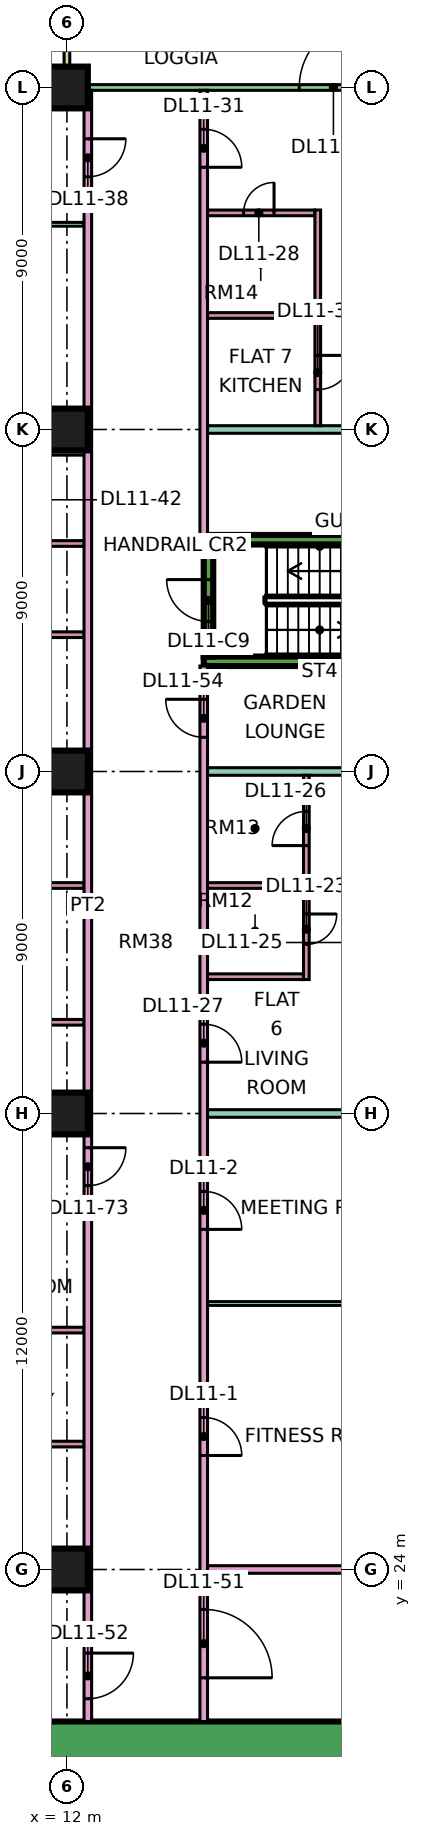
"""IFC4 building model, lengths in metres.
Left out: names, types, materials, properties, quantities, classifications, styles, units other than length and angle.
Written with IfcOpenShell. Run it as: python <this file> out.ifc"""

import sys

from ifc_helpers import new_model, si_unit, direction, frame, frame_2d, origin, origin_2d, place, context, subcontext, project, spatial, rectangle, extrude, element, fill, save


model = new_model("IFC4")
c1 = context("Model", 3, precision=1e-05, world=origin(), true_north=direction((0.0, 1.0)))
c2 = subcontext(c1, "Body", "Model", "MODEL_VIEW")
j1 = project(units=[si_unit("LENGTHUNIT", "METRE"), si_unit("PLANEANGLEUNIT", "RADIAN")], contexts=[c1])
p1 = place(None, origin())
s1 = spatial("IfcSite", under=j1, at=p1, CompositionType="ELEMENT")
p2 = place(p1, origin())
s2 = spatial("IfcBuilding", under=s1, at=p2, CompositionType="ELEMENT")
p3 = place(p2, frame((0.0, 0.0, 56.4)))
s3 = spatial("IfcBuildingStorey", under=s2, at=p3, CompositionType="ELEMENT", Elevation=56.4)
for number, where, z_axis, x_axis in (
    (1, (12.0, 24.0, 0.0), (0.0, 0.0, 1.0), (1.0, 0.0, 0.0)),
    (2, (12.0, 36.0, 0.0), (0.0, 0.0, 1.0), (1.0, 0.0, 0.0)),
    (3, (12.0, 45.0, 0.0), (0.0, 0.0, 1.0), (1.0, 0.0, 0.0)),
    (4, (12.0, 54.0, 0.0), (0.0, 0.0, 1.0), (1.0, 0.0, 0.0)),
    (5, (12.0, 63.0, 0.0), (0.0, 0.0, 1.0), (1.0, 0.0, 0.0)),
):
    element("IfcColumn", number, at=place(p3, frame(where, z_axis=z_axis, x_axis=x_axis)), inside=s3, PredefinedType="COLUMN", context=c2, shape_type="SweptSolid", body=[
        extrude(rectangle(XDim=1.1, YDim=1.1, at=origin_2d()), origin(), (0.0, 0.0, 1.0), 3.75),
    ])
p4 = place(p3, frame((9.0, 19.45, 0.0), z_axis=(0.0, 0.0, 1.0), x_axis=(1.0, 0.0, 0.0)))
e6 = element("IfcWall", 6, at=p4, inside=s3, PredefinedType="SHEAR", context=c2, shape_type="SweptSolid", body=[
    extrude(rectangle(XDim=25.0, YDim=1.1, at=frame_2d((12.5, 0.0))), origin(), (0.0, 0.0, 1.0), 3.75),
])
p5 = place(p4, frame((19.1, 0.0, 0.0)))
e7 = element("IfcOpeningElement", 7, at=p5, cuts=e6, PredefinedType="OPENING", context=c2, shape_type="SweptSolid", body=[
    extrude(rectangle(XDim=1.8, YDim=2.4, at=frame_2d((0.9, 1.2))), frame((0.0, 0.56, 0.0), z_axis=(0.0, -1.0, 0.0), x_axis=(1.0, 0.0, 0.0)), (0.0, 0.0, 1.0), 1.12),
])
for number, where, z_axis, x_axis in (
    (8, (15.6, 47.9, 0.0), (0.0, 0.0, 1.0), (1.0, 0.0, 0.0)),
    (9, (15.6, 51.1, 0.0), (0.0, 0.0, 1.0), (1.0, 0.0, 0.0)),
):
    element("IfcWall", number, at=place(p3, frame(where, z_axis=z_axis, x_axis=x_axis)), inside=s3, PredefinedType="SHEAR", context=c2, shape_type="SweptSolid", body=[
        extrude(rectangle(XDim=7.0, YDim=0.25, at=frame_2d((3.5, 0.0))), origin(), (0.0, 0.0, 1.0), 3.75),
    ])
p6 = place(p3, frame((15.725, 48.025, 0.0), z_axis=(0.0, 0.0, 1.0), x_axis=(0.0, 1.0, 0.0)))
e10 = element("IfcWall", 10, at=p6, inside=s3, PredefinedType="SHEAR", context=c2, shape_type="SweptSolid", body=[
    extrude(rectangle(XDim=2.95, YDim=0.25, at=frame_2d((1.475, 0.0))), origin(), (0.0, 0.0, 1.0), 3.75),
])
p7 = place(p6, frame((0.925, 0.0, 0.0)))
e11 = element("IfcOpeningElement", 11, at=p7, cuts=e10, PredefinedType="OPENING", context=c2, shape_type="SweptSolid", body=[
    extrude(rectangle(XDim=1.1, YDim=2.2, at=frame_2d((0.55, 1.1))), frame((0.0, 0.135, 0.0), z_axis=(0.0, -1.0, 0.0), x_axis=(1.0, 0.0, 0.0)), (0.0, 0.0, 1.0), 0.27),
])
p8 = place(p3, frame((22.425, 63.0, 0.0), z_axis=(0.0, 0.0, 1.0), x_axis=(-1.0, 0.0, 0.0)))
e12 = element("IfcWall", 12, at=p8, inside=s3, PredefinedType="SOLIDWALL", context=c2, shape_type="SweptSolid", body=[
    extrude(rectangle(XDim=10.35, YDim=0.15, at=frame_2d((5.175, 0.0))), origin(), (0.0, 0.0, 1.0), 3.35),
])
p9 = place(p8, frame((2.512, 0.0, 0.0)))
e13 = element("IfcOpeningElement", 13, at=p9, cuts=e12, PredefinedType="OPENING", context=c2, shape_type="SweptSolid", body=[
    extrude(rectangle(XDim=1.8, YDim=2.4, at=frame_2d((0.9, 1.2))), frame((0.0, 0.085, 0.0), z_axis=(0.0, -1.0, 0.0), x_axis=(1.0, 0.0, 0.0)), (0.0, 0.0, 1.0), 0.17),
])
p10 = place(p3, frame((12.0, 64.5, 0.0), z_axis=(0.0, 0.0, 1.0), x_axis=(0.0, -1.0, 0.0)))
e14 = element("IfcWall", 14, at=p10, inside=s3, PredefinedType="SOLIDWALL", context=c2, shape_type="SweptSolid", body=[
    extrude(rectangle(XDim=1.5, YDim=0.15, at=frame_2d((0.75, 0.0))), origin(), (0.0, 0.0, 1.0), 3.35),
])
p11 = place(p3, frame((0.0, 36.0, 0.0), z_axis=(0.0, 0.0, 1.0), x_axis=(1.0, 0.0, 0.0)))
e15 = element("IfcWall", 15, at=p11, inside=s3, PredefinedType="PARTITIONING", context=c2, shape_type="SweptSolid", body=[
    extrude(rectangle(XDim=12.45, YDim=0.2, at=frame_2d((6.225, 0.0))), origin(), (0.0, 0.0, 1.0), 3.35),
])
p12 = place(p3, frame((0.074, 22.4, 0.0), z_axis=(0.0, 0.0, 1.0), x_axis=(1.0, 0.0, 0.0)))
e16 = element("IfcWall", 16, at=p12, inside=s3, PredefinedType="PARTITIONING", context=c2, shape_type="SweptSolid", body=[
    extrude(rectangle(XDim=12.376, YDim=0.2, at=frame_2d((6.188, 0.0))), origin(), (0.0, 0.0, 1.0), 3.35),
])
for number, where, z_axis, x_axis in (
    (17, (7.225, 38.4, 0.0), (0.0, 0.0, 1.0), (1.0, 0.0, 0.0)),
    (18, (7.225, 42.0, 0.0), (0.0, 0.0, 1.0), (1.0, 0.0, 0.0)),
    (19, (7.225, 45.0, 0.0), (0.0, 0.0, 1.0), (1.0, 0.0, 0.0)),
    (20, (7.225, 48.6, 0.0), (0.0, 0.0, 1.0), (1.0, 0.0, 0.0)),
    (21, (7.225, 51.0, 0.0), (0.0, 0.0, 1.0), (1.0, 0.0, 0.0)),
    (22, (7.225, 53.4, 0.0), (0.0, 0.0, 1.0), (1.0, 0.0, 0.0)),
):
    element("IfcWall", number, at=place(p3, frame(where, z_axis=z_axis, x_axis=x_axis)), inside=s3, PredefinedType="PARTITIONING", context=c2, shape_type="SweptSolid", body=[
        extrude(rectangle(XDim=5.225, YDim=0.15, at=frame_2d((2.612, 0.0))), origin(), (0.0, 0.0, 1.0), 3.35),
    ])
p13 = place(p3, frame((7.225, 59.4, 0.0), z_axis=(0.0, 0.0, 1.0), x_axis=(1.0, 0.0, 0.0)))
e23 = element("IfcWall", 23, at=p13, inside=s3, PredefinedType="PARTITIONING", context=c2, shape_type="SweptSolid", body=[
    extrude(rectangle(XDim=5.225, YDim=0.1, at=frame_2d((2.612, 0.0))), origin(), (0.0, 0.0, 1.0), 3.35),
])
for number, where, z_axis, x_axis in (
    (24, (8.425, 27.3, 0.0), (0.0, 0.0, 1.0), (1.0, 0.0, 0.0)),
    (25, (8.425, 30.3, 0.0), (0.0, 0.0, 1.0), (1.0, 0.0, 0.0)),
    (26, (8.425, 33.3, 0.0), (0.0, 0.0, 1.0), (1.0, 0.0, 0.0)),
):
    element("IfcWall", number, at=place(p3, frame(where, z_axis=z_axis, x_axis=x_axis)), inside=s3, PredefinedType="PARTITIONING", context=c2, shape_type="SweptSolid", body=[
        extrude(rectangle(XDim=4.025, YDim=0.15, at=frame_2d((2.012, 0.0))), origin(), (0.0, 0.0, 1.0), 3.35),
    ])
p14 = place(p3, frame((12.55, 20.0, 0.0), z_axis=(0.0, 0.0, 1.0), x_axis=(0.0, 1.0, 0.0)))
e27 = element("IfcWall", 27, at=p14, inside=s3, PredefinedType="PARTITIONING", context=c2, shape_type="SweptSolid", body=[
    extrude(rectangle(XDim=42.926, YDim=0.2, at=frame_2d((21.463, 0.0))), origin(), (0.0, 0.0, 1.0), 3.35),
])
p15 = place(p14, frame((40.65, 0.0, 0.0)))
e28 = element("IfcOpeningElement", 28, at=p15, cuts=e27, PredefinedType="OPENING", context=c2, shape_type="SweptSolid", body=[
    extrude(rectangle(XDim=1.0, YDim=2.1, at=frame_2d((0.5, 1.05))), frame((0.0, 0.11, 0.0), z_axis=(0.0, -1.0, 0.0), x_axis=(1.0, 0.0, 0.0)), (0.0, 0.0, 1.0), 0.22),
])
p16 = place(p14, frame((0.6, 0.0, 0.0)))
e29 = element("IfcOpeningElement", 29, at=p16, cuts=e27, PredefinedType="OPENING", context=c2, shape_type="SweptSolid", body=[
    extrude(rectangle(XDim=1.2, YDim=2.1, at=frame_2d((0.6, 1.05))), frame((0.0, 0.11, 0.0), z_axis=(0.0, -1.0, 0.0), x_axis=(1.0, 0.0, 0.0)), (0.0, 0.0, 1.0), 0.22),
])
p17 = place(p14, frame((14.1, 0.0, 0.0)))
e30 = element("IfcOpeningElement", 30, at=p17, cuts=e27, PredefinedType="OPENING", context=c2, shape_type="SweptSolid", body=[
    extrude(rectangle(XDim=1.0, YDim=2.1, at=frame_2d((0.5, 1.05))), frame((0.0, 0.11, 0.0), z_axis=(0.0, -1.0, 0.0), x_axis=(1.0, 0.0, 0.0)), (0.0, 0.0, 1.0), 0.22),
])
p18 = place(p3, frame((15.6, 20.0, 0.0), z_axis=(0.0, 0.0, 1.0), x_axis=(0.0, 1.0, 0.0)))
e31 = element("IfcWall", 31, at=p18, inside=s3, PredefinedType="PARTITIONING", context=c2, shape_type="SweptSolid", body=[
    extrude(rectangle(XDim=27.775, YDim=0.2, at=frame_2d((13.887, 0.0))), origin(), (0.0, 0.0, 1.0), 3.35),
])
p19 = place(p18, frame((7.0, 0.0, 0.0)))
e32 = element("IfcOpeningElement", 32, at=p19, cuts=e31, PredefinedType="OPENING", context=c2, shape_type="SweptSolid", body=[
    extrude(rectangle(XDim=1.0, YDim=2.1, at=frame_2d((0.5, 1.05))), frame((0.0, 0.11, 0.0), z_axis=(0.0, -1.0, 0.0), x_axis=(1.0, 0.0, 0.0)), (0.0, 0.0, 1.0), 0.22),
])
p20 = place(p18, frame((12.95, 0.0, 0.0)))
e33 = element("IfcOpeningElement", 33, at=p20, cuts=e31, PredefinedType="OPENING", context=c2, shape_type="SweptSolid", body=[
    extrude(rectangle(XDim=1.0, YDim=2.1, at=frame_2d((0.5, 1.05))), frame((0.0, 0.11, 0.0), z_axis=(0.0, -1.0, 0.0), x_axis=(1.0, 0.0, 0.0)), (0.0, 0.0, 1.0), 0.22),
])
p21 = place(p18, frame((17.35, 0.0, 0.0)))
e34 = element("IfcOpeningElement", 34, at=p21, cuts=e31, PredefinedType="OPENING", context=c2, shape_type="SweptSolid", body=[
    extrude(rectangle(XDim=1.0, YDim=2.1, at=frame_2d((0.5, 1.05))), frame((0.0, 0.11, 0.0), z_axis=(0.0, -1.0, 0.0), x_axis=(1.0, 0.0, 0.0)), (0.0, 0.0, 1.0), 0.22),
])
p22 = place(p18, frame((1.15, 0.0, 0.0)))
e35 = element("IfcOpeningElement", 35, at=p22, cuts=e31, PredefinedType="OPENING", context=c2, shape_type="SweptSolid", body=[
    extrude(rectangle(XDim=1.8, YDim=2.1, at=frame_2d((0.9, 1.05))), frame((0.0, 0.11, 0.0), z_axis=(0.0, -1.0, 0.0), x_axis=(1.0, 0.0, 0.0)), (0.0, 0.0, 1.0), 0.22),
])
p23 = place(p18, frame((25.9, 0.0, 0.0)))
e36 = element("IfcOpeningElement", 36, at=p23, cuts=e31, PredefinedType="OPENING", context=c2, shape_type="SweptSolid", body=[
    extrude(rectangle(XDim=1.0, YDim=2.1, at=frame_2d((0.5, 1.05))), frame((0.0, 0.11, 0.0), z_axis=(0.0, -1.0, 0.0), x_axis=(1.0, 0.0, 0.0)), (0.0, 0.0, 1.0), 0.22),
])
p24 = place(p3, frame((15.6, 51.225, 0.0), z_axis=(0.0, 0.0, 1.0), x_axis=(0.0, 1.0, 0.0)))
e37 = element("IfcWall", 37, at=p24, inside=s3, PredefinedType="PARTITIONING", context=c2, shape_type="SweptSolid", body=[
    extrude(rectangle(XDim=11.701, YDim=0.2, at=frame_2d((5.851, 0.0))), origin(), (0.0, 0.0, 1.0), 3.35),
])
p25 = place(p24, frame((9.675, 0.0, 0.0)))
e38 = element("IfcOpeningElement", 38, at=p25, cuts=e37, PredefinedType="OPENING", context=c2, shape_type="SweptSolid", body=[
    extrude(rectangle(XDim=1.0, YDim=2.1, at=frame_2d((0.5, 1.05))), frame((0.0, 0.11, 0.0), z_axis=(0.0, -1.0, 0.0), x_axis=(1.0, 0.0, 0.0)), (0.0, 0.0, 1.0), 0.22),
])
p26 = place(p3, frame((15.7, 24.0, 0.0), z_axis=(0.0, 0.0, 1.0), x_axis=(1.0, 0.0, 0.0)))
e39 = element("IfcWall", 39, at=p26, inside=s3, PredefinedType="PARTITIONING", context=c2, shape_type="SweptSolid", body=[
    extrude(rectangle(XDim=5.8, YDim=0.2, at=frame_2d((2.9, 0.0))), origin(), (0.0, 0.0, 1.0), 3.35),
])
p27 = place(p3, frame((15.7, 31.0, 0.0), z_axis=(0.0, 0.0, 1.0), x_axis=(1.0, 0.0, 0.0)))
e40 = element("IfcWall", 40, at=p27, inside=s3, PredefinedType="PARTITIONING", context=c2, shape_type="SweptSolid", body=[
    extrude(rectangle(XDim=5.8, YDim=0.1, at=frame_2d((2.9, 0.0))), origin(), (0.0, 0.0, 1.0), 3.35),
])
p28 = place(p3, frame((15.7, 36.0, 0.0), z_axis=(0.0, 0.0, 1.0), x_axis=(1.0, 0.0, 0.0)))
e41 = element("IfcWall", 41, at=p28, inside=s3, PredefinedType="PARTITIONING", context=c2, shape_type="SweptSolid", body=[
    extrude(rectangle(XDim=8.3, YDim=0.2, at=frame_2d((4.15, 0.0))), origin(), (0.0, 0.0, 1.0), 3.35),
])
for number, where, z_axis, x_axis in (
    (42, (15.7, 39.6, 0.0), (0.0, 0.0, 1.0), (1.0, 0.0, 0.0)),
    (43, (15.7, 42.0, 0.0), (0.0, 0.0, 1.0), (1.0, 0.0, 0.0)),
):
    element("IfcWall", number, at=place(p3, frame(where, z_axis=z_axis, x_axis=x_axis)), inside=s3, PredefinedType="PARTITIONING", context=c2, shape_type="SweptSolid", body=[
        extrude(rectangle(XDim=2.525, YDim=0.15, at=frame_2d((1.263, 0.0))), origin(), (0.0, 0.0, 1.0), 3.35),
    ])
p29 = place(p3, frame((15.7, 45.0, 0.0), z_axis=(0.0, 0.0, 1.0), x_axis=(1.0, 0.0, 0.0)))
e44 = element("IfcWall", 44, at=p29, inside=s3, PredefinedType="PARTITIONING", context=c2, shape_type="SweptSolid", body=[
    extrude(rectangle(XDim=8.226, YDim=0.2, at=frame_2d((4.113, 0.0))), origin(), (0.0, 0.0, 1.0), 3.35),
])
p30 = place(p3, frame((15.7, 54.0, 0.0), z_axis=(0.0, 0.0, 1.0), x_axis=(1.0, 0.0, 0.0)))
e45 = element("IfcWall", 45, at=p30, inside=s3, PredefinedType="PARTITIONING", context=c2, shape_type="SweptSolid", body=[
    extrude(rectangle(XDim=8.3, YDim=0.2, at=frame_2d((4.15, 0.0))), origin(), (0.0, 0.0, 1.0), 3.35),
])
p31 = place(p3, frame((15.7, 57.0, 0.0), z_axis=(0.0, 0.0, 1.0), x_axis=(1.0, 0.0, 0.0)))
e46 = element("IfcWall", 46, at=p31, inside=s3, PredefinedType="PARTITIONING", context=c2, shape_type="SweptSolid", body=[
    extrude(rectangle(XDim=2.825, YDim=0.15, at=frame_2d((1.413, 0.0))), origin(), (0.0, 0.0, 1.0), 3.35),
])
p32 = place(p3, frame((15.7, 59.7, 0.0), z_axis=(0.0, 0.0, 1.0), x_axis=(1.0, 0.0, 0.0)))
e47 = element("IfcWall", 47, at=p32, inside=s3, PredefinedType="PARTITIONING", context=c2, shape_type="SweptSolid", body=[
    extrude(rectangle(XDim=2.825, YDim=0.15, at=frame_2d((1.413, 0.0))), origin(), (0.0, 0.0, 1.0), 3.35),
])
p33 = place(p32, frame((0.95, 0.0, 0.0)))
e48 = element("IfcOpeningElement", 48, at=p33, cuts=e47, PredefinedType="OPENING", context=c2, shape_type="SweptSolid", body=[
    extrude(rectangle(XDim=0.8, YDim=2.1, at=frame_2d((0.4, 1.05))), frame((0.0, 0.085, 0.0), z_axis=(0.0, -1.0, 0.0), x_axis=(1.0, 0.0, 0.0)), (0.0, 0.0, 1.0), 0.17),
])
p34 = place(p3, frame((18.3, 39.525, 0.0), z_axis=(0.0, 0.0, 1.0), x_axis=(0.0, 1.0, 0.0)))
e49 = element("IfcWall", 49, at=p34, inside=s3, PredefinedType="PARTITIONING", context=c2, shape_type="SweptSolid", body=[
    extrude(rectangle(XDim=5.375, YDim=0.15, at=frame_2d((2.688, 0.0))), origin(), (0.0, 0.0, 1.0), 3.35),
])
p35 = place(p34, frame((0.925, 0.0, 0.0)))
e50 = element("IfcOpeningElement", 50, at=p35, cuts=e49, PredefinedType="OPENING", context=c2, shape_type="SweptSolid", body=[
    extrude(rectangle(XDim=0.8, YDim=2.1, at=frame_2d((0.4, 1.05))), frame((0.0, 0.085, 0.0), z_axis=(0.0, -1.0, 0.0), x_axis=(1.0, 0.0, 0.0)), (0.0, 0.0, 1.0), 0.17),
])
p36 = place(p34, frame((3.525, 0.0, 0.0)))
e51 = element("IfcOpeningElement", 51, at=p36, cuts=e49, PredefinedType="OPENING", context=c2, shape_type="SweptSolid", body=[
    extrude(rectangle(XDim=0.9, YDim=2.1, at=frame_2d((0.45, 1.05))), frame((0.0, 0.085, 0.0), z_axis=(0.0, -1.0, 0.0), x_axis=(1.0, 0.0, 0.0)), (0.0, 0.0, 1.0), 0.17),
])
p37 = place(p3, frame((18.6, 54.1, 0.0), z_axis=(0.0, 0.0, 1.0), x_axis=(0.0, 1.0, 0.0)))
e52 = element("IfcWall", 52, at=p37, inside=s3, PredefinedType="PARTITIONING", context=c2, shape_type="SweptSolid", body=[
    extrude(rectangle(XDim=5.675, YDim=0.15, at=frame_2d((2.837, 0.0))), origin(), (0.0, 0.0, 1.0), 3.35),
])
p38 = place(p37, frame((0.95, 0.0, 0.0)))
e53 = element("IfcOpeningElement", 53, at=p38, cuts=e52, PredefinedType="OPENING", context=c2, shape_type="SweptSolid", body=[
    extrude(rectangle(XDim=0.9, YDim=2.1, at=frame_2d((0.45, 1.05))), frame((0.0, 0.085, 0.0), z_axis=(0.0, -1.0, 0.0), x_axis=(1.0, 0.0, 0.0)), (0.0, 0.0, 1.0), 0.17),
])
p39 = place(p9, frame((1.8, 0.0, 0.0), z_axis=(0.0, 0.0, 1.0), x_axis=(-1.0, 0.0, 0.0)))
e54 = element("IfcDoor", 54, at=p39, inside=s3, OperationType="DOUBLE_DOOR_SINGLE_SWING", PredefinedType="DOOR", context=c2, shape_type="SweptSolid", body=[
    extrude(rectangle(XDim=1.8, YDim=2.4, at=frame_2d((0.9, 1.2))), frame((0.0, 0.025, 0.0), z_axis=(0.0, -1.0, 0.0), x_axis=(1.0, 0.0, 0.0)), (0.0, 0.0, 1.0), 0.05),
])
fill(e13, e54)
p40 = place(p7, frame((1.1, 0.0, 0.0), z_axis=(0.0, 0.0, 1.0), x_axis=(-1.0, 0.0, 0.0)))
e55 = element("IfcDoor", 55, at=p40, inside=s3, OperationType="SINGLE_SWING_RIGHT", PredefinedType="DOOR", context=c2, shape_type="SweptSolid", body=[
    extrude(rectangle(XDim=1.1, YDim=2.2, at=frame_2d((0.55, 1.1))), frame((0.0, 0.025, 0.0), z_axis=(0.0, -1.0, 0.0), x_axis=(1.0, 0.0, 0.0)), (0.0, 0.0, 1.0), 0.05),
])
fill(e11, e55)
p41 = place(p19, frame((1.0, 0.0, 0.0), z_axis=(0.0, 0.0, 1.0), x_axis=(-1.0, 0.0, 0.0)))
e56 = element("IfcDoor", 56, at=p41, inside=s3, OperationType="SINGLE_SWING_LEFT", PredefinedType="DOOR", context=c2, shape_type="SweptSolid", body=[
    extrude(rectangle(XDim=1.0, YDim=2.1, at=frame_2d((0.5, 1.05))), frame((0.0, 0.025, 0.0), z_axis=(0.0, -1.0, 0.0), x_axis=(1.0, 0.0, 0.0)), (0.0, 0.0, 1.0), 0.05),
])
fill(e32, e56)
p42 = place(p20, frame((1.0, 0.0, 0.0), z_axis=(0.0, 0.0, 1.0), x_axis=(-1.0, 0.0, 0.0)))
e57 = element("IfcDoor", 57, at=p42, inside=s3, OperationType="SINGLE_SWING_LEFT", PredefinedType="DOOR", context=c2, shape_type="SweptSolid", body=[
    extrude(rectangle(XDim=1.0, YDim=2.1, at=frame_2d((0.5, 1.05))), frame((0.0, 0.025, 0.0), z_axis=(0.0, -1.0, 0.0), x_axis=(1.0, 0.0, 0.0)), (0.0, 0.0, 1.0), 0.05),
])
fill(e33, e57)
p43 = place(p35, origin())
e58 = element("IfcDoor", 58, at=p43, inside=s3, OperationType="SINGLE_SWING_RIGHT", PredefinedType="DOOR", context=c2, shape_type="SweptSolid", body=[
    extrude(rectangle(XDim=0.8, YDim=2.1, at=frame_2d((0.4, 1.05))), frame((0.0, 0.025, 0.0), z_axis=(0.0, -1.0, 0.0), x_axis=(1.0, 0.0, 0.0)), (0.0, 0.0, 1.0), 0.05),
])
fill(e50, e58)
p44 = place(p36, origin())
e59 = element("IfcDoor", 59, at=p44, inside=s3, OperationType="SINGLE_SWING_LEFT", PredefinedType="DOOR", context=c2, shape_type="SweptSolid", body=[
    extrude(rectangle(XDim=0.9, YDim=2.1, at=frame_2d((0.45, 1.05))), frame((0.0, 0.025, 0.0), z_axis=(0.0, -1.0, 0.0), x_axis=(1.0, 0.0, 0.0)), (0.0, 0.0, 1.0), 0.05),
])
fill(e51, e59)
p45 = place(p21, frame((1.0, 0.0, 0.0), z_axis=(0.0, 0.0, 1.0), x_axis=(-1.0, 0.0, 0.0)))
e60 = element("IfcDoor", 60, at=p45, inside=s3, OperationType="SINGLE_SWING_LEFT", PredefinedType="DOOR", context=c2, shape_type="SweptSolid", body=[
    extrude(rectangle(XDim=1.0, YDim=2.1, at=frame_2d((0.5, 1.05))), frame((0.0, 0.025, 0.0), z_axis=(0.0, -1.0, 0.0), x_axis=(1.0, 0.0, 0.0)), (0.0, 0.0, 1.0), 0.05),
])
fill(e34, e60)
p46 = place(p33, frame((0.8, 0.0, 0.0), z_axis=(0.0, 0.0, 1.0), x_axis=(-1.0, 0.0, 0.0)))
e61 = element("IfcDoor", 61, at=p46, inside=s3, OperationType="SINGLE_SWING_RIGHT", PredefinedType="DOOR", context=c2, shape_type="SweptSolid", body=[
    extrude(rectangle(XDim=0.8, YDim=2.1, at=frame_2d((0.4, 1.05))), frame((0.0, 0.025, 0.0), z_axis=(0.0, -1.0, 0.0), x_axis=(1.0, 0.0, 0.0)), (0.0, 0.0, 1.0), 0.05),
])
fill(e48, e61)
p47 = place(p38, origin())
e62 = element("IfcDoor", 62, at=p47, inside=s3, OperationType="SINGLE_SWING_RIGHT", PredefinedType="DOOR", context=c2, shape_type="SweptSolid", body=[
    extrude(rectangle(XDim=0.9, YDim=2.1, at=frame_2d((0.45, 1.05))), frame((0.0, 0.025, 0.0), z_axis=(0.0, -1.0, 0.0), x_axis=(1.0, 0.0, 0.0)), (0.0, 0.0, 1.0), 0.05),
])
fill(e53, e62)
p48 = place(p25, frame((1.0, 0.0, 0.0), z_axis=(0.0, 0.0, 1.0), x_axis=(-1.0, 0.0, 0.0)))
e63 = element("IfcDoor", 63, at=p48, inside=s3, OperationType="SINGLE_SWING_LEFT", PredefinedType="DOOR", context=c2, shape_type="SweptSolid", body=[
    extrude(rectangle(XDim=1.0, YDim=2.1, at=frame_2d((0.5, 1.05))), frame((0.0, 0.025, 0.0), z_axis=(0.0, -1.0, 0.0), x_axis=(1.0, 0.0, 0.0)), (0.0, 0.0, 1.0), 0.05),
])
fill(e38, e63)
p49 = place(p15, origin())
e64 = element("IfcDoor", 64, at=p49, inside=s3, OperationType="SINGLE_SWING_RIGHT", PredefinedType="DOOR", context=c2, shape_type="SweptSolid", body=[
    extrude(rectangle(XDim=1.0, YDim=2.1, at=frame_2d((0.5, 1.05))), frame((0.0, 0.025, 0.0), z_axis=(0.0, -1.0, 0.0), x_axis=(1.0, 0.0, 0.0)), (0.0, 0.0, 1.0), 0.05),
])
fill(e28, e64)
p50 = place(p22, frame((1.8, 0.0, 0.0), z_axis=(0.0, 0.0, 1.0), x_axis=(-1.0, 0.0, 0.0)))
e65 = element("IfcDoor", 65, at=p50, inside=s3, OperationType="DOUBLE_DOOR_SINGLE_SWING", PredefinedType="DOOR", context=c2, shape_type="SweptSolid", body=[
    extrude(rectangle(XDim=1.8, YDim=2.1, at=frame_2d((0.9, 1.05))), frame((0.0, 0.025, 0.0), z_axis=(0.0, -1.0, 0.0), x_axis=(1.0, 0.0, 0.0)), (0.0, 0.0, 1.0), 0.05),
])
fill(e35, e65)
p51 = place(p16, origin())
e66 = element("IfcDoor", 66, at=p51, inside=s3, OperationType="SINGLE_SWING_RIGHT", PredefinedType="DOOR", context=c2, shape_type="SweptSolid", body=[
    extrude(rectangle(XDim=1.2, YDim=2.1, at=frame_2d((0.6, 1.05))), frame((0.0, 0.025, 0.0), z_axis=(0.0, -1.0, 0.0), x_axis=(1.0, 0.0, 0.0)), (0.0, 0.0, 1.0), 0.05),
])
fill(e29, e66)
p52 = place(p23, frame((1.0, 0.0, 0.0), z_axis=(0.0, 0.0, 1.0), x_axis=(-1.0, 0.0, 0.0)))
e67 = element("IfcDoor", 67, at=p52, inside=s3, OperationType="SINGLE_SWING_RIGHT", PredefinedType="DOOR", context=c2, shape_type="SweptSolid", body=[
    extrude(rectangle(XDim=1.0, YDim=2.1, at=frame_2d((0.5, 1.05))), frame((0.0, 0.025, 0.0), z_axis=(0.0, -1.0, 0.0), x_axis=(1.0, 0.0, 0.0)), (0.0, 0.0, 1.0), 0.05),
])
fill(e36, e67)
p53 = place(p17, origin())
e68 = element("IfcDoor", 68, at=p53, inside=s3, OperationType="SINGLE_SWING_RIGHT", PredefinedType="DOOR", context=c2, shape_type="SweptSolid", body=[
    extrude(rectangle(XDim=1.0, YDim=2.1, at=frame_2d((0.5, 1.05))), frame((0.0, 0.025, 0.0), z_axis=(0.0, -1.0, 0.0), x_axis=(1.0, 0.0, 0.0)), (0.0, 0.0, 1.0), 0.05),
])
fill(e30, e68)
save(model, sys.argv[1])
